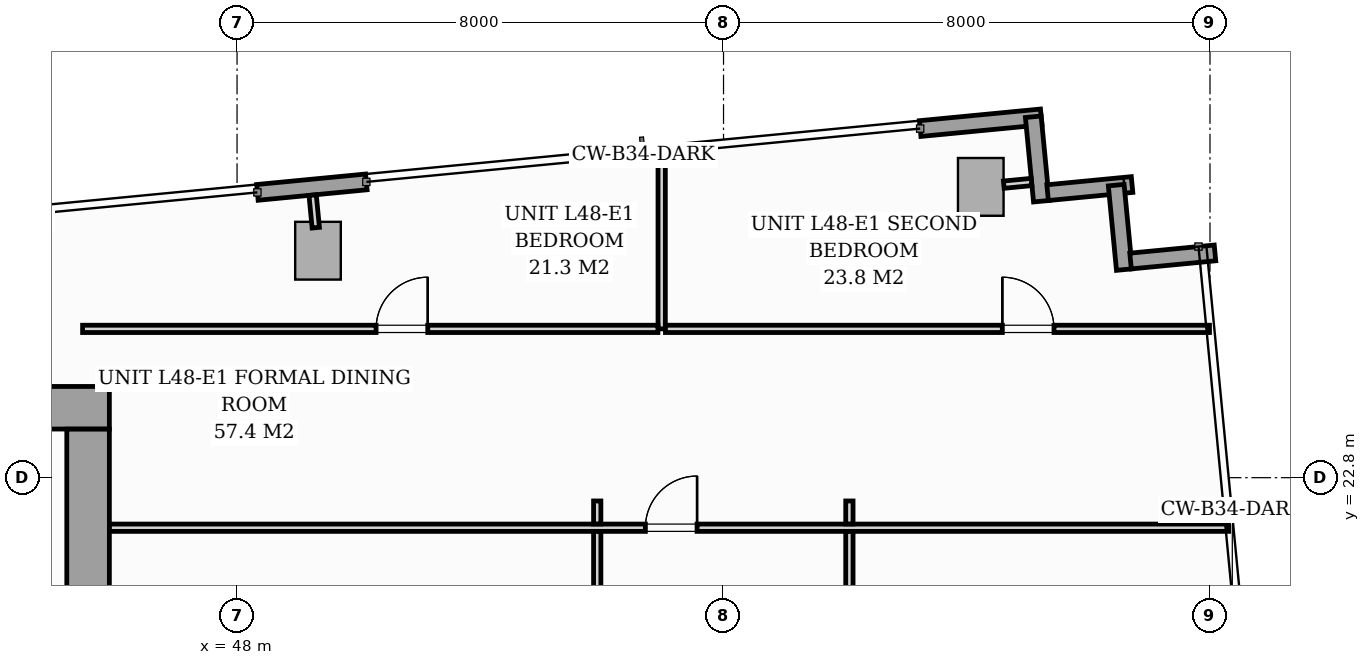
"""IFC4 building model, lengths in metres.
Left out: names, types, materials, properties, quantities, classifications, styles, units other than length and angle.
Written with IfcOpenShell. Run it as: python <this file> out.ifc"""

import sys

from ifc_helpers import new_model, si_unit, direction, frame, frame_2d, origin, origin_2d, place, context, subcontext, project, spatial, rectangle, i_section, extrude, source, transform, mapped, element, fill, save


model = new_model("IFC4")
c1 = context("Model", 3, precision=1e-05, world=origin(), true_north=direction((0.0, 1.0)))
c2 = subcontext(c1, "Body", "Model", "MODEL_VIEW")
j1 = project(units=[si_unit("LENGTHUNIT", "METRE"), si_unit("PLANEANGLEUNIT", "RADIAN")], contexts=[c1])
p1 = place(None, origin())
s1 = spatial("IfcSite", under=j1, at=p1, CompositionType="ELEMENT")
p2 = place(p1, origin())
s2 = spatial("IfcBuilding", under=s1, at=p2, CompositionType="ELEMENT")
p3 = place(p2, frame((0.0, 0.0, 167.8)))
s3 = spatial("IfcBuildingStorey", under=s2, at=p3, CompositionType="ELEMENT", Elevation=167.8)
m1 = source(origin(), c2, "Body", "SweptSolid", [
    extrude(i_section(OverallWidth=0.416, OverallDepth=0.446, WebThickness=0.039, FlangeThickness=0.063, FilletRadius=0.018, at=origin_2d()), origin(), (0.0, 0.0, 1.0), 5.196),
])
p4 = place(p3, frame((45.6, 24.0, 0.002), z_axis=(0.0, 0.0, 1.0), x_axis=(1.0, 0.0, 0.0)))
e1 = element("IfcColumn", 1, at=p4, inside=s3, PredefinedType="PILASTER", context=c2, shape_type="MappedRepresentation", body=[
    mapped(m1, transform((0.0, 0.0, 0.0), scale=1.0)),
])
m2 = source(origin(), c2, "Body", "SweptSolid", [
    extrude(rectangle(XDim=0.75, YDim=0.95, at=origin_2d()), origin(), (0.0, 0.0, 1.0), 5.194),
])
for number, where, z_axis, x_axis in (
    (2, (49.331, 26.533, 0.004), (0.0, 0.0, 1.0), (0.995, 0.096, 0.0)),
    (3, (60.23, 27.582, 0.004), (0.0, 0.0, 1.0), (0.995, 0.096, 0.0)),
):
    element("IfcColumn", number, at=place(p3, frame(where, z_axis=z_axis, x_axis=x_axis)), inside=s3, PredefinedType="COLUMN", context=c2, shape_type="MappedRepresentation", body=[
        mapped(m2, transform((0.0, 0.0, 0.0), scale=1.0)),
    ])
p5 = place(p3, frame((48.334, 27.491, 0.0), z_axis=(0.0, 0.0, 1.0), x_axis=(0.995391866735, 0.09589072759, 0.0)))
e4 = element("IfcWall", 4, at=p5, inside=s3, PredefinedType="STANDARD", context=c2, shape_type="SweptSolid", body=[
    extrude(rectangle(XDim=1.8, YDim=0.26, at=frame_2d((0.9, 0.0))), origin(), (0.0, 0.0, 1.0), 4.94),
])
p6 = place(p3, frame((59.234, 28.541, 0.0), z_axis=(0.0, 0.0, 1.0), x_axis=(0.995398960025, 0.095817067274, 0.0)))
e5 = element("IfcWall", 5, at=p6, inside=s3, PredefinedType="STANDARD", context=c2, shape_type="SweptSolid", body=[
    extrude(rectangle(XDim=2.0, YDim=0.26, at=frame_2d((1.0, 0.0))), origin(), (0.0, 0.0, 1.0), 4.94),
])
p7 = place(p3, frame((61.094, 28.735, 0.0), z_axis=(0.0, 0.0, 1.0), x_axis=(0.095742423056, -0.99540614245, 0.0)))
e6 = element("IfcWall", 6, at=p7, inside=s3, PredefinedType="STANDARD", context=c2, shape_type="SweptSolid", body=[
    extrude(rectangle(XDim=1.395, YDim=0.26, at=frame_2d((0.697, 0.0))), origin(), (0.0, 0.0, 1.0), 4.94),
])
p8 = place(p3, frame((61.33, 27.487, 0.0), z_axis=(0.0, 0.0, 1.0), x_axis=(0.995391056452, 0.09589913835, 0.0)))
e7 = element("IfcWall", 7, at=p8, inside=s3, PredefinedType="STANDARD", context=c2, shape_type="SweptSolid", body=[
    extrude(rectangle(XDim=1.395, YDim=0.26, at=frame_2d((0.698, 0.0))), origin(), (0.0, 0.0, 1.0), 4.94),
])
for number, where, z_axis, x_axis in (
    (8, (62.458, 27.611, 0.0), (0.0, 0.0, 1.0), (0.096, -0.995, 0.0)),
    (9, (62.694, 26.363, 0.0), (0.0, 0.0, 1.0), (0.995, 0.096, 0.0)),
):
    element("IfcWall", number, at=place(p3, frame(where, z_axis=z_axis, x_axis=x_axis)), inside=s3, PredefinedType="STANDARD", context=c2, shape_type="SweptSolid", body=[
        extrude(rectangle(XDim=1.395, YDim=0.26, at=frame_2d((0.697, 0.0))), origin(), (0.0, 0.0, 1.0), 4.94),
    ])
p9 = place(p3, frame((26.1, 23.95, 0.0), z_axis=(0.0, 0.0, 1.0), x_axis=(1.0, 0.0, 0.0)))
e10 = element("IfcWall", 10, at=p9, inside=s3, PredefinedType="SHEAR", context=c2, shape_type="SweptSolid", body=[
    extrude(rectangle(XDim=19.8, YDim=0.7, at=frame_2d((9.9, 0.0))), origin(), (0.0, 0.0, 1.0), 5.2),
])
p10 = place(p3, frame((45.55, 17.802, 0.0), z_axis=(0.0, 0.0, 1.0), x_axis=(0.0, 1.0, 0.0)))
e11 = element("IfcWall", 11, at=p10, inside=s3, PredefinedType="SHEAR", context=c2, shape_type="SweptSolid", body=[
    extrude(rectangle(XDim=5.796, YDim=0.7, at=frame_2d((2.898, 0.0))), origin(), (0.0, 0.0, 1.0), 5.2),
])
p11 = place(p3, frame((54.983, 25.247, 0.0), z_axis=(0.0, 0.0, 1.0), x_axis=(0.0, 1.0, 0.0)))
e12 = element("IfcWall", 12, at=p11, inside=s3, PredefinedType="PARTITIONING", context=c2, shape_type="SweptSolid", body=[
    extrude(rectangle(XDim=2.935, YDim=0.12, at=frame_2d((1.467, 0.0))), origin(), (0.0, 0.0, 1.0), 4.94),
])
p12 = place(p3, frame((45.46, 25.247, 0.0), z_axis=(0.0, 0.0, 1.0), x_axis=(1.0, 0.0, 0.0)))
e13 = element("IfcWall", 13, at=p12, inside=s3, PredefinedType="PARTITIONING", context=c2, shape_type="SweptSolid", body=[
    extrude(rectangle(XDim=9.461, YDim=0.12, at=frame_2d((4.73, 0.0))), origin(), (0.0, 0.0, 1.0), 4.94),
])
p13 = place(p12, frame((4.826, 0.0, 0.0)))
e14 = element("IfcOpeningElement", 14, at=p13, cuts=e13, PredefinedType="OPENING", context=c2, shape_type="SweptSolid", body=[
    extrude(rectangle(XDim=0.85, YDim=2.05, at=frame_2d((0.425, 1.025))), frame((0.0, 0.07, 0.0), z_axis=(0.0, -1.0, 0.0), x_axis=(1.0, 0.0, 0.0)), (0.0, 0.0, 1.0), 0.14),
])
p14 = place(p3, frame((55.045, 25.247, 0.0), z_axis=(0.0, 0.0, 1.0), x_axis=(1.0, 0.0, 0.0)))
e15 = element("IfcWall", 15, at=p14, inside=s3, PredefinedType="PARTITIONING", context=c2, shape_type="SweptSolid", body=[
    extrude(rectangle(XDim=8.947, YDim=0.12, at=frame_2d((4.473, 0.0))), origin(), (0.0, 0.0, 1.0), 4.94),
])
p15 = place(p14, frame((5.54, 0.0, 0.0)))
e16 = element("IfcOpeningElement", 16, at=p15, cuts=e15, PredefinedType="OPENING", context=c2, shape_type="SweptSolid", body=[
    extrude(rectangle(XDim=0.85, YDim=2.05, at=frame_2d((0.425, 1.025))), frame((0.0, 0.07, 0.0), z_axis=(0.0, -1.0, 0.0), x_axis=(1.0, 0.0, 0.0)), (0.0, 0.0, 1.0), 0.14),
])
p16 = place(p3, frame((45.902, 21.977, 0.0), z_axis=(0.0, 0.0, 1.0), x_axis=(1.0, 0.0, 0.0)))
e17 = element("IfcWall", 17, at=p16, inside=s3, PredefinedType="PARTITIONING", context=c2, shape_type="SweptSolid", body=[
    extrude(rectangle(XDim=18.404, YDim=0.12, at=frame_2d((9.202, 0.0))), origin(), (0.0, 0.0, 1.0), 4.94),
])
p17 = place(p16, frame((8.813, 0.0, 0.0)))
e18 = element("IfcOpeningElement", 18, at=p17, cuts=e17, PredefinedType="OPENING", context=c2, shape_type="SweptSolid", body=[
    extrude(rectangle(XDim=0.85, YDim=2.05, at=frame_2d((0.425, 1.025))), frame((0.0, 0.07, 0.0), z_axis=(0.0, -1.0, 0.0), x_axis=(1.0, 0.0, 0.0)), (0.0, 0.0, 1.0), 0.14),
])
p18 = place(p3, frame((58.07, 11.44, 0.0), z_axis=(0.0, 0.0, 1.0), x_axis=(0.0, 1.0, 0.0)))
e19 = element("IfcWall", 19, at=p18, inside=s3, PredefinedType="PARTITIONING", context=c2, shape_type="SweptSolid", body=[
    extrude(rectangle(XDim=10.475, YDim=0.12, at=frame_2d((5.238, 0.0))), origin(), (0.0, 0.0, 1.0), 4.94),
])
p19 = place(p18, frame((5.502, 0.0, 0.0)))
e20 = element("IfcOpeningElement", 20, at=p19, cuts=e19, PredefinedType="OPENING", context=c2, shape_type="SweptSolid", body=[
    extrude(rectangle(XDim=0.55, YDim=2.0, at=frame_2d((0.275, 1.0))), frame((0.0, 0.07, 0.0), z_axis=(0.0, -1.0, 0.0), x_axis=(1.0, 0.0, 0.0)), (0.0, 0.0, 1.0), 0.14),
])
p20 = place(p3, frame((58.07, 22.039, 0.0), z_axis=(0.0, 0.0, 1.0), x_axis=(0.0, 1.0, 0.0)))
e21 = element("IfcWall", 21, at=p20, inside=s3, PredefinedType="PARTITIONING", context=c2, shape_type="SweptSolid", body=[
    extrude(rectangle(XDim=0.378, YDim=0.12, at=frame_2d((0.189, 0.0))), origin(), (0.0, 0.0, 1.0), 4.94),
])
p21 = place(p3, frame((53.923, 11.44, 0.0), z_axis=(0.0, 0.0, 1.0), x_axis=(0.0, 1.0, 0.0)))
e22 = element("IfcWall", 22, at=p21, inside=s3, PredefinedType="PARTITIONING", context=c2, shape_type="SweptSolid", body=[
    extrude(rectangle(XDim=10.475, YDim=0.12, at=frame_2d((5.238, 0.0))), origin(), (0.0, 0.0, 1.0), 4.94),
])
p22 = place(p21, frame((4.812, 0.0, 0.0)))
e23 = element("IfcOpeningElement", 23, at=p22, cuts=e22, PredefinedType="OPENING", context=c2, shape_type="SweptSolid", body=[
    extrude(rectangle(XDim=0.85, YDim=2.05, at=frame_2d((0.425, 1.025))), frame((0.0, 0.07, 0.0), z_axis=(0.0, -1.0, 0.0), x_axis=(1.0, 0.0, 0.0)), (0.0, 0.0, 1.0), 0.14),
])
p23 = place(p3, frame((53.923, 22.039, 0.0), z_axis=(0.0, 0.0, 1.0), x_axis=(0.0, 1.0, 0.0)))
e24 = element("IfcWall", 24, at=p23, inside=s3, PredefinedType="PARTITIONING", context=c2, shape_type="SweptSolid", body=[
    extrude(rectangle(XDim=0.378, YDim=0.12, at=frame_2d((0.189, 0.0))), origin(), (0.0, 0.0, 1.0), 4.94),
])
p24 = place(p3, frame((49.294, 26.911, 0.0), z_axis=(0.0, 0.0, 1.0), x_axis=(-0.095772948675, 0.995403205893, 0.0)))
e25 = element("IfcWall", 25, at=p24, inside=s3, PredefinedType="PARTITIONING", context=c2, shape_type="SweptSolid", body=[
    extrude(rectangle(XDim=0.538, YDim=0.12, at=frame_2d((0.269, 0.0))), origin(), (0.0, 0.0, 1.0), 4.94),
])
p25 = place(p3, frame((60.609, 27.618, 0.0), z_axis=(0.0, 0.0, 1.0), x_axis=(0.995384576284, 0.09596637586, 0.0)))
e26 = element("IfcWall", 26, at=p25, inside=s3, PredefinedType="PARTITIONING", context=c2, shape_type="SweptSolid", body=[
    extrude(rectangle(XDim=0.458, YDim=0.12, at=frame_2d((0.229, 0.0))), origin(), (0.0, 0.0, 1.0), 4.94),
])
m3 = source(origin(), c2, "Body", "SweptSolid", [
    extrude(rectangle(XDim=0.85, YDim=2.05, at=frame_2d((0.425, 1.025))), frame((0.0, 0.025, 0.0), z_axis=(0.0, -1.0, 0.0), x_axis=(1.0, 0.0, 0.0)), (0.0, 0.0, 1.0), 0.05),
])
p26 = place(p13, origin())
e27 = element("IfcDoor", 27, at=p26, inside=s3, OperationType="SINGLE_SWING_RIGHT", PredefinedType="DOOR", context=c2, shape_type="MappedRepresentation", body=[
    mapped(m3, transform((0.0, 0.0, 0.0), scale=1.0)),
])
fill(e14, e27)
p27 = place(p15, origin())
e28 = element("IfcDoor", 28, at=p27, inside=s3, OperationType="SINGLE_SWING_LEFT", PredefinedType="DOOR", context=c2, shape_type="MappedRepresentation", body=[
    mapped(m3, transform((0.0, 0.0, 0.0), scale=1.0)),
])
fill(e16, e28)
p28 = place(p17, origin())
e29 = element("IfcDoor", 29, at=p28, inside=s3, OperationType="SINGLE_SWING_RIGHT", PredefinedType="DOOR", context=c2, shape_type="MappedRepresentation", body=[
    mapped(m3, transform((0.0, 0.0, 0.0), scale=1.0)),
])
fill(e18, e29)
save(model, sys.argv[1])
